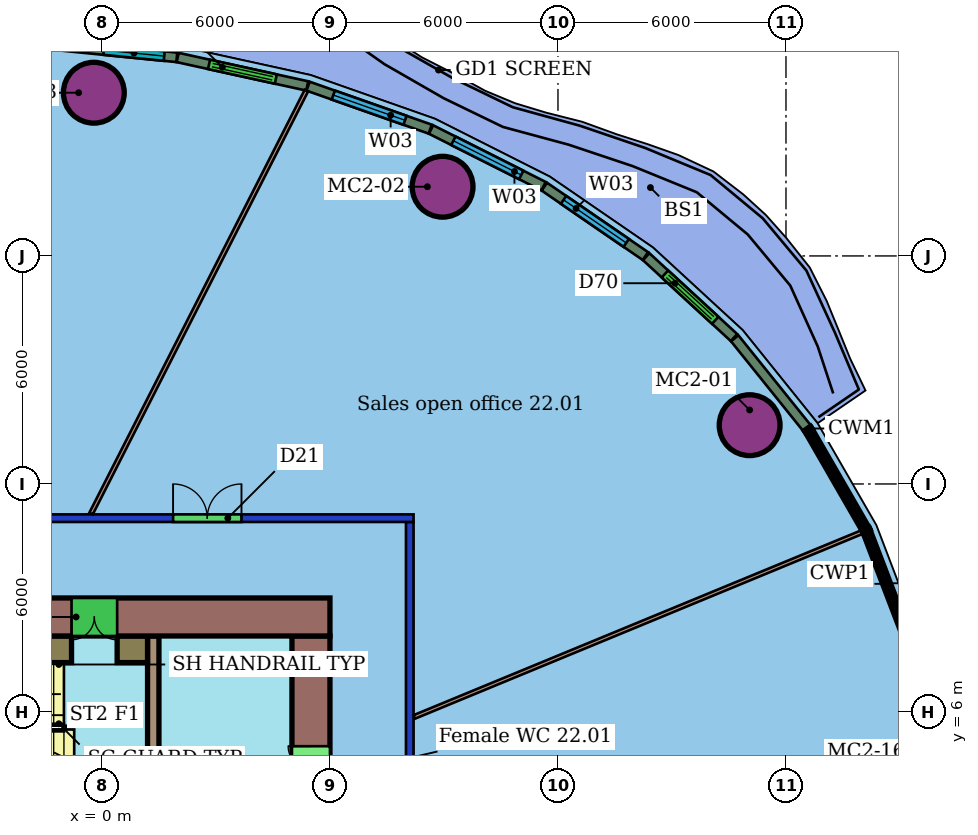
"""IFC4 building model, lengths in metres.
Left out: names, types, materials, properties, quantities, classifications, styles, units other than length and angle.
Written with IfcOpenShell. Run it as: python <this file> out.ifc"""

import sys

from ifc_helpers import new_model, si_unit, direction, frame, frame_2d, origin, origin_2d, place, context, subcontext, project, spatial, rectangle, hollow_circle, extrude, element, fill, save


model = new_model("IFC4")
c1 = context("Model", 3, precision=1e-05, world=origin(), true_north=direction((0.0, 1.0)))
c2 = subcontext(c1, "Body", "Model", "MODEL_VIEW")
j1 = project(units=[si_unit("LENGTHUNIT", "METRE"), si_unit("PLANEANGLEUNIT", "RADIAN")], contexts=[c1])
p1 = place(None, origin())
s1 = spatial("IfcSite", under=j1, at=p1, CompositionType="ELEMENT")
p2 = place(p1, origin())
s2 = spatial("IfcBuilding", under=s1, at=p2, CompositionType="ELEMENT")
p3 = place(p2, frame((0.0, 0.0, 99.4)))
s3 = spatial("IfcBuildingStorey", under=s2, at=p3, CompositionType="ELEMENT", Elevation=99.4)
for number, where, z_axis, x_axis in (
    (1, (17.043, 13.547, 0.0), (0.0, 0.0, 1.0), (1.0, 0.0, 0.0)),
    (2, (8.963, 19.821, 0.0), (0.0, 0.0, 1.0), (1.0, 0.0, 0.0)),
    (3, (-0.213, 22.294, 0.0), (0.0, 0.0, 1.0), (1.0, 0.0, 0.0)),
):
    element("IfcColumn", number, at=place(p3, frame(where, z_axis=z_axis, x_axis=x_axis)), inside=s3, PredefinedType="COLUMN", context=c2, shape_type="SweptSolid", body=[
        extrude(hollow_circle(Radius=0.8, WallThickness=0.055, at=origin_2d()), origin(), (0.0, 0.0, 1.0), 3.45),
    ])
p4 = place(p3, frame((-20.2, 11.1, 0.0), z_axis=(0.0, 0.0, 1.0), x_axis=(1.0, 0.0, 0.0)))
e4 = element("IfcWall", 4, at=p4, inside=s3, PredefinedType="PARTITIONING", context=c2, shape_type="SweptSolid", body=[
    extrude(rectangle(XDim=28.4, YDim=0.2, at=frame_2d((14.2, 0.0))), origin(), (0.0, 0.0, 1.0), 3.0),
])
p5 = place(p4, frame((22.072, 0.0, 0.0)))
e5 = element("IfcOpeningElement", 5, at=p5, cuts=e4, PredefinedType="OPENING", context=c2, shape_type="SweptSolid", body=[
    extrude(rectangle(XDim=1.8, YDim=2.1, at=frame_2d((0.9, 1.05))), frame((0.0, 0.11, 0.0), z_axis=(0.0, -1.0, 0.0), x_axis=(1.0, 0.0, 0.0)), (0.0, 0.0, 1.0), 0.22),
])
p6 = place(p4, frame((16.343, 0.0, 0.0)))
e6 = element("IfcOpeningElement", 6, at=p6, cuts=e4, PredefinedType="OPENING", context=c2, shape_type="SweptSolid", body=[
    extrude(rectangle(XDim=1.0, YDim=2.1, at=frame_2d((0.5, 1.05))), frame((0.0, 0.11, 0.0), z_axis=(0.0, -1.0, 0.0), x_axis=(1.0, 0.0, 0.0)), (0.0, 0.0, 1.0), 0.22),
])
p7 = place(p4, frame((7.687, 0.0, 0.0)))
e7 = element("IfcOpeningElement", 7, at=p7, cuts=e4, PredefinedType="OPENING", context=c2, shape_type="SweptSolid", body=[
    extrude(rectangle(XDim=1.0, YDim=2.4, at=frame_2d((0.5, 1.2))), frame((0.0, 0.11, 0.0), z_axis=(0.0, -1.0, 0.0), x_axis=(1.0, 0.0, 0.0)), (0.0, 0.0, 1.0), 0.22),
])
p8 = place(p4, frame((3.746, 0.0, 0.0)))
e8 = element("IfcOpeningElement", 8, at=p8, cuts=e4, PredefinedType="OPENING", context=c2, shape_type="SweptSolid", body=[
    extrude(rectangle(XDim=0.9, YDim=2.1, at=frame_2d((0.45, 1.05))), frame((0.0, 0.11, 0.0), z_axis=(0.0, -1.0, 0.0), x_axis=(1.0, 0.0, 0.0)), (0.0, 0.0, 1.0), 0.22),
])
p9 = place(p3, frame((8.1, 11.0, 0.0), z_axis=(0.0, 0.0, 1.0), x_axis=(0.0, -1.0, 0.0)))
e9 = element("IfcWall", 9, at=p9, inside=s3, PredefinedType="PARTITIONING", context=c2, shape_type="SweptSolid", body=[
    extrude(rectangle(XDim=22.0, YDim=0.2, at=frame_2d((11.0, 0.0))), origin(), (0.0, 0.0, 1.0), 3.0),
])
p10 = place(p9, frame((14.764, 0.0, 0.0)))
e10 = element("IfcOpeningElement", 10, at=p10, cuts=e9, PredefinedType="OPENING", context=c2, shape_type="SweptSolid", body=[
    extrude(rectangle(XDim=1.5, YDim=2.1, at=frame_2d((0.75, 1.05))), frame((0.0, 0.11, 0.0), z_axis=(0.0, -1.0, 0.0), x_axis=(1.0, 0.0, 0.0)), (0.0, 0.0, 1.0), 0.22),
])
p11 = place(p9, frame((7.189, 0.0, 0.0)))
e11 = element("IfcOpeningElement", 11, at=p11, cuts=e9, PredefinedType="OPENING", context=c2, shape_type="SweptSolid", body=[
    extrude(rectangle(XDim=1.8, YDim=2.1, at=frame_2d((0.9, 1.05))), frame((0.0, 0.11, 0.0), z_axis=(0.0, -1.0, 0.0), x_axis=(1.0, 0.0, 0.0)), (0.0, 0.0, 1.0), 0.22),
])
p12 = place(p3, frame((19.996, 10.732, 0.0), z_axis=(0.0, 0.0, 1.0), x_axis=(-0.924331668554, -0.381590050325, 0.0)))
e12 = element("IfcWall", 12, at=p12, inside=s3, PredefinedType="PARTITIONING", context=c2, shape_type="SweptSolid", body=[
    extrude(rectangle(XDim=12.741, YDim=0.1, at=frame_2d((6.371, 0.0))), origin(), (0.0, 0.0, 1.0), 3.45),
])
p13 = place(p3, frame((5.38, 22.35, 0.0), z_axis=(0.0, 0.0, 1.0), x_axis=(-0.453731880265, -0.891138250122, 0.0)))
e13 = element("IfcWall", 13, at=p13, inside=s3, PredefinedType="PARTITIONING", context=c2, shape_type="SweptSolid", body=[
    extrude(rectangle(XDim=12.487, YDim=0.1, at=frame_2d((6.244, 0.0))), origin(), (0.0, 0.0, 1.0), 3.45),
])
p14 = place(p3, frame((18.551, 13.471, 0.0), z_axis=(0.0, 0.0, 1.0), x_axis=(-0.626892577284, 0.779105703064, 0.0)))
e14 = element("IfcWall", 14, at=p14, inside=s3, PredefinedType="SOLIDWALL", context=c2, shape_type="SweptSolid", body=[
    extrude(rectangle(XDim=3.031, YDim=0.25, at=frame_2d((1.516, 0.0))), origin(), (0.0, 0.0, 1.0), 3.05),
])
p15 = place(p3, frame((16.632, 15.852, 0.0), z_axis=(0.0, 0.0, 1.0), x_axis=(-0.735604195004, 0.677411594448, 0.0)))
e15 = element("IfcWall", 15, at=p15, inside=s3, PredefinedType="SOLIDWALL", context=c2, shape_type="SweptSolid", body=[
    extrude(rectangle(XDim=3.142, YDim=0.25, at=frame_2d((1.571, 0.0))), origin(), (0.0, 0.0, 1.0), 3.05),
])
p16 = place(p15, frame((0.671, 0.0, 0.0)))
e16 = element("IfcOpeningElement", 16, at=p16, cuts=e15, PredefinedType="OPENING", context=c2, shape_type="SweptSolid", body=[
    extrude(rectangle(XDim=1.8, YDim=2.4, at=frame_2d((0.9, 1.2))), frame((0.0, 0.135, 0.0), z_axis=(0.0, -1.0, 0.0), x_axis=(1.0, 0.0, 0.0)), (0.0, 0.0, 1.0), 0.27),
])
p17 = place(p3, frame((14.301, 17.997, 0.0), z_axis=(0.0, 0.0, 1.0), x_axis=(-0.824260519644, 0.566210734405, 0.0)))
e17 = element("IfcWall", 17, at=p17, inside=s3, PredefinedType="SOLIDWALL", context=c2, shape_type="SweptSolid", body=[
    extrude(rectangle(XDim=3.225, YDim=0.25, at=frame_2d((1.613, 0.0))), origin(), (0.0, 0.0, 1.0), 3.05),
])
p18 = place(p17, frame((0.613, 0.0, 0.9)))
e18 = element("IfcOpeningElement", 18, at=p18, cuts=e17, PredefinedType="OPENING", context=c2, shape_type="SweptSolid", body=[
    extrude(rectangle(XDim=2.0, YDim=2.1, at=frame_2d((1.0, 1.05))), frame((0.0, 0.135, 0.0), z_axis=(0.0, -1.0, 0.0), x_axis=(1.0, 0.0, 0.0)), (0.0, 0.0, 1.0), 0.27),
])
p19 = place(p3, frame((11.621, 19.835, 0.0), z_axis=(0.0, 0.0, 1.0), x_axis=(-0.893097754404, 0.449862646904, 0.0)))
e19 = element("IfcWall", 19, at=p19, inside=s3, PredefinedType="SOLIDWALL", context=c2, shape_type="SweptSolid", body=[
    extrude(rectangle(XDim=3.315, YDim=0.25, at=frame_2d((1.658, 0.0))), origin(), (0.0, 0.0, 1.0), 3.05),
])
p20 = place(p19, frame((0.658, 0.0, 0.9)))
e20 = element("IfcOpeningElement", 20, at=p20, cuts=e19, PredefinedType="OPENING", context=c2, shape_type="SweptSolid", body=[
    extrude(rectangle(XDim=2.0, YDim=2.1, at=frame_2d((1.0, 1.05))), frame((0.0, 0.135, 0.0), z_axis=(0.0, -1.0, 0.0), x_axis=(1.0, 0.0, 0.0)), (0.0, 0.0, 1.0), 0.27),
])
p21 = place(p3, frame((8.638, 21.336, 0.0), z_axis=(0.0, 0.0, 1.0), x_axis=(-0.94334314228, 0.331818799819, 0.0)))
e21 = element("IfcWall", 21, at=p21, inside=s3, PredefinedType="SOLIDWALL", context=c2, shape_type="SweptSolid", body=[
    extrude(rectangle(XDim=3.406, YDim=0.25, at=frame_2d((1.703, 0.0))), origin(), (0.0, 0.0, 1.0), 3.05),
])
p22 = place(p21, frame((0.703, 0.0, 0.9)))
e22 = element("IfcOpeningElement", 22, at=p22, cuts=e21, PredefinedType="OPENING", context=c2, shape_type="SweptSolid", body=[
    extrude(rectangle(XDim=2.0, YDim=2.1, at=frame_2d((1.0, 1.05))), frame((0.0, 0.135, 0.0), z_axis=(0.0, -1.0, 0.0), x_axis=(1.0, 0.0, 0.0)), (0.0, 0.0, 1.0), 0.27),
])
p23 = place(p3, frame((5.403, 22.473, 0.0), z_axis=(0.0, 0.0, 1.0), x_axis=(-0.976728623895, 0.214478892352, 0.0)))
e23 = element("IfcWall", 23, at=p23, inside=s3, PredefinedType="SOLIDWALL", context=c2, shape_type="SweptSolid", body=[
    extrude(rectangle(XDim=3.491, YDim=0.25, at=frame_2d((1.746, 0.0))), origin(), (0.0, 0.0, 1.0), 3.05),
])
p24 = place(p23, frame((0.846, 0.0, 0.0)))
e24 = element("IfcOpeningElement", 24, at=p24, cuts=e23, PredefinedType="OPENING", context=c2, shape_type="SweptSolid", body=[
    extrude(rectangle(XDim=1.8, YDim=2.4, at=frame_2d((0.9, 1.2))), frame((0.0, 0.135, 0.0), z_axis=(0.0, -1.0, 0.0), x_axis=(1.0, 0.0, 0.0)), (0.0, 0.0, 1.0), 0.27),
])
p25 = place(p3, frame((1.97, 23.225, 0.0), z_axis=(0.0, 0.0, 1.0), x_axis=(-0.995080479837, 0.099069867505, 0.0)))
e25 = element("IfcWall", 25, at=p25, inside=s3, PredefinedType="SOLIDWALL", context=c2, shape_type="SweptSolid", body=[
    extrude(rectangle(XDim=3.566, YDim=0.25, at=frame_2d((1.783, 0.0))), origin(), (0.0, 0.0, 1.0), 3.05),
])
p26 = place(p25, frame((0.333, 0.0, 0.9)))
e26 = element("IfcOpeningElement", 26, at=p26, cuts=e25, PredefinedType="OPENING", context=c2, shape_type="SweptSolid", body=[
    extrude(rectangle(XDim=1.6, YDim=2.1, at=frame_2d((0.8, 1.05))), frame((0.0, 0.135, 0.0), z_axis=(0.0, -1.0, 0.0), x_axis=(1.0, 0.0, 0.0)), (0.0, 0.0, 1.0), 0.27),
])
p27 = place(p3, frame((6.0, 8.5, 0.0), z_axis=(0.0, 0.0, 1.0), x_axis=(-1.0, 0.0, 0.0)))
e27 = element("IfcWall", 27, at=p27, inside=s3, PredefinedType="SHEAR", context=c2, shape_type="SweptSolid", body=[
    extrude(rectangle(XDim=12.0, YDim=1.0, at=frame_2d((6.0, 0.0))), origin(), (0.0, 0.0, 1.0), 3.3),
])
p28 = place(p27, frame((5.6, 0.0, 0.0)))
e28 = element("IfcOpeningElement", 28, at=p28, cuts=e27, PredefinedType="OPENING", context=c2, shape_type="SweptSolid", body=[
    extrude(rectangle(XDim=1.2, YDim=2.1, at=frame_2d((0.6, 1.05))), frame((0.0, 0.51, 0.0), z_axis=(0.0, -1.0, 0.0), x_axis=(1.0, 0.0, 0.0)), (0.0, 0.0, 1.0), 1.02),
])
p29 = place(p3, frame((5.5, -8.0, 0.0), z_axis=(0.0, 0.0, 1.0), x_axis=(0.0, 1.0, 0.0)))
e29 = element("IfcWall", 29, at=p29, inside=s3, PredefinedType="SHEAR", context=c2, shape_type="SweptSolid", body=[
    extrude(rectangle(XDim=16.0, YDim=1.0, at=frame_2d((8.0, 0.0))), origin(), (0.0, 0.0, 1.0), 3.3),
])
p30 = place(p29, frame((2.9, 0.0, 0.0)))
e30 = element("IfcOpeningElement", 30, at=p30, cuts=e29, PredefinedType="OPENING", context=c2, shape_type="SweptSolid", body=[
    extrude(rectangle(XDim=1.2, YDim=2.1, at=frame_2d((0.6, 1.05))), frame((0.0, 0.51, 0.0), z_axis=(0.0, -1.0, 0.0), x_axis=(1.0, 0.0, 0.0)), (0.0, 0.0, 1.0), 1.02),
])
p31 = place(p29, frame((11.9, 0.0, 0.0)))
e31 = element("IfcOpeningElement", 31, at=p31, cuts=e29, PredefinedType="OPENING", context=c2, shape_type="SweptSolid", body=[
    extrude(rectangle(XDim=1.2, YDim=2.1, at=frame_2d((0.6, 1.05))), frame((0.0, 0.51, 0.0), z_axis=(0.0, -1.0, 0.0), x_axis=(1.0, 0.0, 0.0)), (0.0, 0.0, 1.0), 1.02),
])
p32 = place(p3, frame((1.35, -8.0, 0.0), z_axis=(0.0, 0.0, 1.0), x_axis=(0.0, 1.0, 0.0)))
e32 = element("IfcWall", 32, at=p32, inside=s3, PredefinedType="SHEAR", context=c2, shape_type="SweptSolid", body=[
    extrude(rectangle(XDim=16.0, YDim=0.3, at=frame_2d((8.0, 0.0))), origin(), (0.0, 0.0, 1.0), 3.3),
])
p33 = place(p32, frame((1.91, 0.0, 0.0)))
e33 = element("IfcOpeningElement", 33, at=p33, cuts=e32, PredefinedType="OPENING", context=c2, shape_type="SweptSolid", body=[
    extrude(rectangle(XDim=1.0, YDim=2.1, at=frame_2d((0.5, 1.05))), frame((0.0, 0.16, 0.0), z_axis=(0.0, -1.0, 0.0), x_axis=(1.0, 0.0, 0.0)), (0.0, 0.0, 1.0), 0.32),
])
p34 = place(p32, frame((7.25, 0.0, 0.0)))
e34 = element("IfcOpeningElement", 34, at=p34, cuts=e32, PredefinedType="OPENING", context=c2, shape_type="SweptSolid", body=[
    extrude(rectangle(XDim=1.5, YDim=2.1, at=frame_2d((0.75, 1.05))), frame((0.0, 0.16, 0.0), z_axis=(0.0, -1.0, 0.0), x_axis=(1.0, 0.0, 0.0)), (0.0, 0.0, 1.0), 0.32),
])
p35 = place(p3, frame((-5.85, 7.65, 0.0), z_axis=(0.0, 0.0, 1.0), x_axis=(1.0, 0.0, 0.0)))
e35 = element("IfcWall", 35, at=p35, inside=s3, PredefinedType="SHEAR", context=c2, shape_type="SweptSolid", body=[
    extrude(rectangle(XDim=5.05, YDim=0.7, at=frame_2d((2.525, 0.0))), origin(), (0.0, 0.0, 1.0), 3.3),
])
p36 = place(p3, frame((0.4, 7.65, 0.0), z_axis=(0.0, 0.0, 1.0), x_axis=(1.0, 0.0, 0.0)))
e36 = element("IfcWall", 36, at=p36, inside=s3, PredefinedType="SHEAR", context=c2, shape_type="SweptSolid", body=[
    extrude(rectangle(XDim=0.8, YDim=0.7, at=frame_2d((0.4, 0.0))), origin(), (0.0, 0.0, 1.0), 3.3),
])
p37 = place(p5, origin())
e37 = element("IfcDoor", 37, at=p37, inside=s3, OperationType="DOUBLE_DOOR_SINGLE_SWING", PredefinedType="DOOR", context=c2, shape_type="SweptSolid", body=[
    extrude(rectangle(XDim=1.8, YDim=2.1, at=frame_2d((0.9, 1.05))), frame((0.0, 0.025, 0.0), z_axis=(0.0, -1.0, 0.0), x_axis=(1.0, 0.0, 0.0)), (0.0, 0.0, 1.0), 0.05),
])
fill(e5, e37)
p38 = place(p16, origin())
e38 = element("IfcDoor", 38, at=p38, inside=s3, OperationType="DOUBLE_DOOR_SLIDING", PredefinedType="DOOR", context=c2, shape_type="SweptSolid", body=[
    extrude(rectangle(XDim=1.8, YDim=2.4, at=frame_2d((0.9, 1.2))), frame((0.0, 0.025, 0.0), z_axis=(0.0, -1.0, 0.0), x_axis=(1.0, 0.0, 0.0)), (0.0, 0.0, 1.0), 0.05),
])
fill(e16, e38)
p39 = place(p18, origin())
e39 = element("IfcWindow", 39, at=p39, inside=s3, PartitioningType="SINGLE_PANEL", PredefinedType="WINDOW", context=c2, shape_type="SweptSolid", body=[
    extrude(rectangle(XDim=2.0, YDim=2.1, at=frame_2d((1.0, 1.05))), frame((0.0, 0.03, 0.0), z_axis=(0.0, -1.0, 0.0), x_axis=(1.0, 0.0, 0.0)), (0.0, 0.0, 1.0), 0.06),
])
fill(e18, e39)
p40 = place(p20, origin())
e40 = element("IfcWindow", 40, at=p40, inside=s3, PartitioningType="SINGLE_PANEL", PredefinedType="WINDOW", context=c2, shape_type="SweptSolid", body=[
    extrude(rectangle(XDim=2.0, YDim=2.1, at=frame_2d((1.0, 1.05))), frame((0.0, 0.03, 0.0), z_axis=(0.0, -1.0, 0.0), x_axis=(1.0, 0.0, 0.0)), (0.0, 0.0, 1.0), 0.06),
])
fill(e20, e40)
p41 = place(p22, origin())
e41 = element("IfcWindow", 41, at=p41, inside=s3, PartitioningType="SINGLE_PANEL", PredefinedType="WINDOW", context=c2, shape_type="SweptSolid", body=[
    extrude(rectangle(XDim=2.0, YDim=2.1, at=frame_2d((1.0, 1.05))), frame((0.0, 0.03, 0.0), z_axis=(0.0, -1.0, 0.0), x_axis=(1.0, 0.0, 0.0)), (0.0, 0.0, 1.0), 0.06),
])
fill(e22, e41)
p42 = place(p24, origin())
e42 = element("IfcDoor", 42, at=p42, inside=s3, OperationType="DOUBLE_DOOR_SLIDING", PredefinedType="DOOR", context=c2, shape_type="SweptSolid", body=[
    extrude(rectangle(XDim=1.8, YDim=2.4, at=frame_2d((0.9, 1.2))), frame((0.0, 0.025, 0.0), z_axis=(0.0, -1.0, 0.0), x_axis=(1.0, 0.0, 0.0)), (0.0, 0.0, 1.0), 0.05),
])
fill(e24, e42)
p43 = place(p26, origin())
e43 = element("IfcWindow", 43, at=p43, inside=s3, PartitioningType="SINGLE_PANEL", PredefinedType="WINDOW", context=c2, shape_type="SweptSolid", body=[
    extrude(rectangle(XDim=1.6, YDim=2.1, at=frame_2d((0.8, 1.05))), frame((0.0, 0.03, 0.0), z_axis=(0.0, -1.0, 0.0), x_axis=(1.0, 0.0, 0.0)), (0.0, 0.0, 1.0), 0.06),
])
fill(e26, e43)
p44 = place(p28, origin())
e44 = element("IfcDoor", 44, at=p44, inside=s3, OperationType="DOUBLE_DOOR_SINGLE_SWING", PredefinedType="NOTDEFINED", context=c2, shape_type="SweptSolid", body=[
    extrude(rectangle(XDim=1.2, YDim=2.1, at=frame_2d((0.6, 1.05))), frame((0.0, 0.025, 0.0), z_axis=(0.0, -1.0, 0.0), x_axis=(1.0, 0.0, 0.0)), (0.0, 0.0, 1.0), 0.05),
])
fill(e28, e44)
p45 = place(p31, origin())
e45 = element("IfcDoor", 45, at=p45, inside=s3, OperationType="DOUBLE_DOOR_SINGLE_SWING", PredefinedType="NOTDEFINED", context=c2, shape_type="SweptSolid", body=[
    extrude(rectangle(XDim=1.2, YDim=2.1, at=frame_2d((0.6, 1.05))), frame((0.0, 0.025, 0.0), z_axis=(0.0, -1.0, 0.0), x_axis=(1.0, 0.0, 0.0)), (0.0, 0.0, 1.0), 0.05),
])
fill(e31, e45)
save(model, sys.argv[1])
